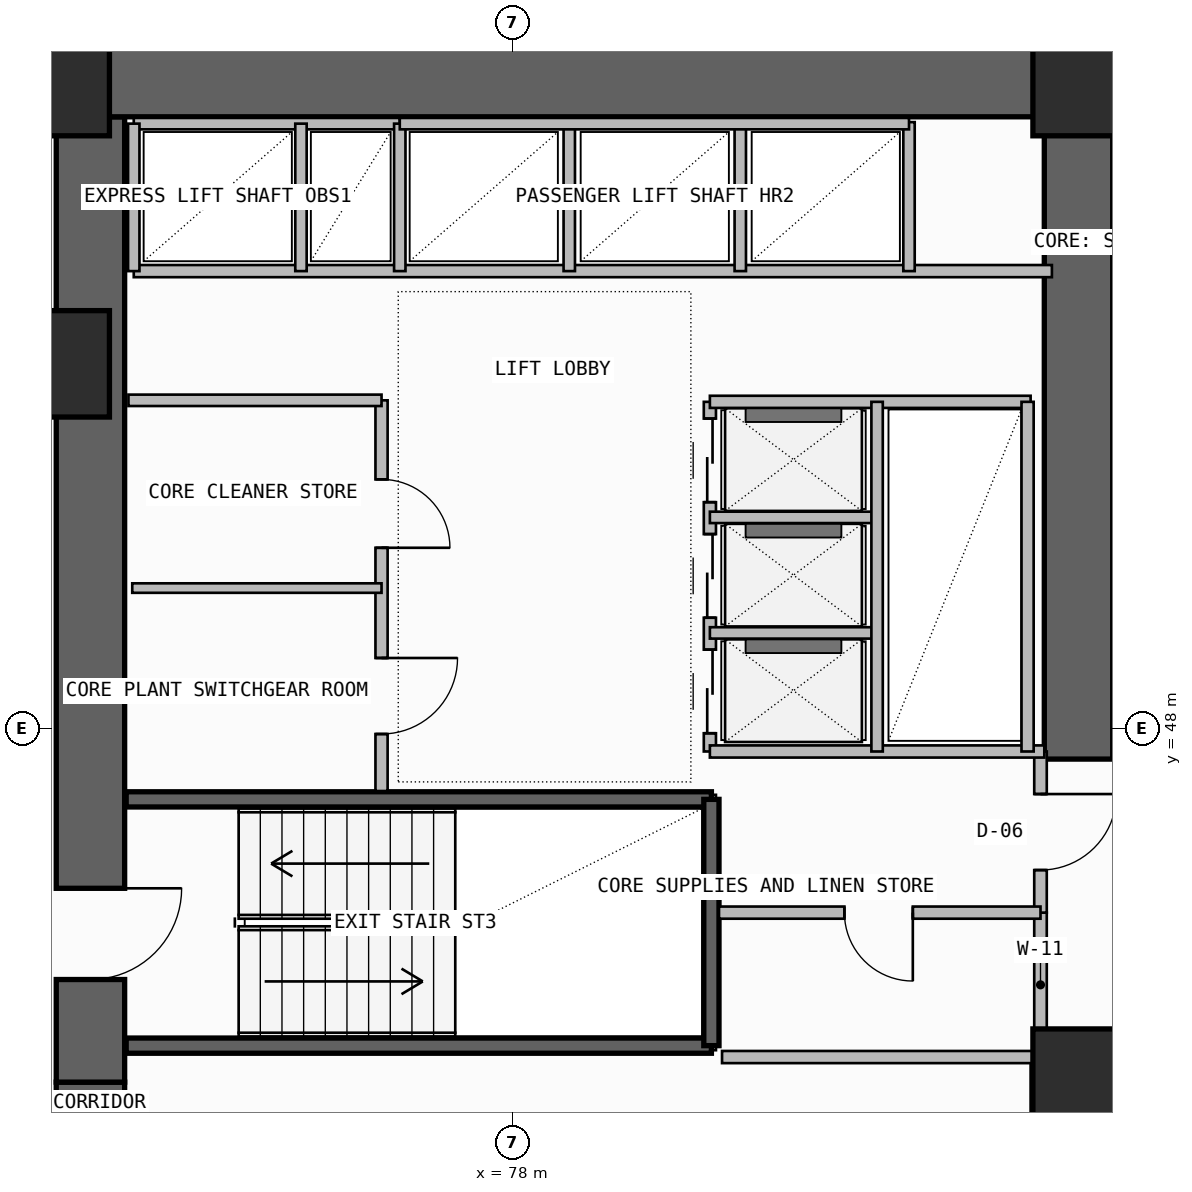
"""IFC4 building model, lengths in metres.
Left out: names, types, materials, properties, quantities, classifications, styles, units other than length and angle.
Written with IfcOpenShell. Run it as: python <this file> out.ifc"""

import sys

from ifc_helpers import new_model, si_unit, direction, frame, frame_2d, origin, origin_2d, place, context, subcontext, project, spatial, rectangle, extrude, element, fill, save


model = new_model("IFC4")
c1 = context("Model", 3, precision=1e-05, world=origin(), true_north=direction((0.0, 1.0)))
c2 = subcontext(c1, "Body", "Model", "MODEL_VIEW")
j1 = project(units=[si_unit("LENGTHUNIT", "METRE"), si_unit("PLANEANGLEUNIT", "RADIAN")], contexts=[c1])
p1 = place(None, origin())
s1 = spatial("IfcSite", under=j1, at=p1, CompositionType="ELEMENT")
p2 = place(p1, origin())
s2 = spatial("IfcBuilding", under=s1, at=p2, CompositionType="ELEMENT")
p3 = place(p2, frame((0.0, 0.0, 113.7)))
s3 = spatial("IfcBuildingStorey", under=s2, at=p3, CompositionType="ELEMENT", Elevation=113.7)
p4 = place(p3, frame((72.45, 35.5, -0.26), z_axis=(0.0, 0.0, 1.0), x_axis=(0.0, 1.0, 0.0)))
e1 = element("IfcWall", 1, at=p4, inside=s3, PredefinedType="SHEAR", context=c2, shape_type="SweptSolid", body=[
    extrude(rectangle(XDim=7.85, YDim=0.9, at=frame_2d((3.925, 0.0))), origin(), (0.0, 0.0, 1.0), 3.6),
])
p5 = place(p4, frame((1.45, 0.0, 0.26)))
e2 = element("IfcOpeningElement", 2, at=p5, cuts=e1, PredefinedType="OPENING", context=c2, shape_type="SweptSolid", body=[
    extrude(rectangle(XDim=1.2, YDim=2.2, at=frame_2d((0.6, 1.1))), frame((0.0, 0.46, 0.0), z_axis=(0.0, -1.0, 0.0), x_axis=(1.0, 0.0, 0.0)), (0.0, 0.0, 1.0), 0.92),
])
p6 = place(p3, frame((72.45, 43.35, -0.26), z_axis=(0.0, 0.0, 1.0), x_axis=(0.0, 1.0, 0.0)))
e3 = element("IfcWall", 3, at=p6, inside=s3, PredefinedType="SHEAR", context=c2, shape_type="SweptSolid", body=[
    extrude(rectangle(XDim=12.7, YDim=0.9, at=frame_2d((6.35, 0.0))), origin(), (0.0, 0.0, 1.0), 3.6),
])
p7 = place(p6, frame((1.35, 0.0, 0.26)))
e4 = element("IfcOpeningElement", 4, at=p7, cuts=e3, PredefinedType="OPENING", context=c2, shape_type="SweptSolid", body=[
    extrude(rectangle(XDim=1.2, YDim=2.2, at=frame_2d((0.6, 1.1))), frame((0.0, 0.46, 0.0), z_axis=(0.0, -1.0, 0.0), x_axis=(1.0, 0.0, 0.0)), (0.0, 0.0, 1.0), 0.92),
])
p8 = place(p3, frame((72.0, 56.5, -0.26), z_axis=(0.0, 0.0, 1.0), x_axis=(1.0, 0.0, 0.0)))
e5 = element("IfcWall", 5, at=p8, inside=s3, PredefinedType="SHEAR", context=c2, shape_type="SweptSolid", body=[
    extrude(rectangle(XDim=13.9, YDim=0.9, at=frame_2d((6.95, 0.0))), origin(), (0.0, 0.0, 1.0), 3.6),
])
p9 = place(p3, frame((85.45, 47.6, -0.26), z_axis=(0.0, 0.0, 1.0), x_axis=(0.0, 1.0, 0.0)))
e6 = element("IfcWall", 6, at=p9, inside=s3, PredefinedType="SHEAR", context=c2, shape_type="SweptSolid", body=[
    extrude(rectangle(XDim=8.45, YDim=0.9, at=frame_2d((4.225, 0.0))), origin(), (0.0, 0.0, 1.0), 3.6),
])
for number, where, z_axis, x_axis in (
    (7, (85.55, 43.35, 0.0), (0.0, 0.0, 1.0), (1.0, 0.0, 0.0)),
    (8, (72.0, 52.8, 0.0), (0.0, 0.0, 1.0), (1.0, 0.0, 0.0)),
    (9, (72.0, 56.5, 0.0), (0.0, 0.0, 1.0), (1.0, 0.0, 0.0)),
    (10, (85.55, 56.5, 0.0), (0.0, 0.0, 1.0), (1.0, 0.0, 0.0)),
):
    element("IfcColumn", number, at=place(p3, frame(where, z_axis=z_axis, x_axis=x_axis)), inside=s3, PredefinedType="COLUMN", context=c2, shape_type="SweptSolid", body=[
        extrude(rectangle(XDim=1.4, YDim=1.4, at=origin_2d()), origin(), (0.0, 0.0, 1.0), 3.6),
    ])
p10 = place(p3, frame((84.92, 38.85, 0.0), z_axis=(0.0, 0.0, 1.0), x_axis=(0.0, 1.0, 0.0)))
e11 = element("IfcWall", 11, at=p10, inside=s3, PredefinedType="SOLIDWALL", context=c2, shape_type="SweptSolid", body=[
    extrude(rectangle(XDim=4.83, YDim=0.2, at=frame_2d((2.415, 0.0))), origin(), (0.0, 0.0, 1.0), 3.34),
])
p11 = place(p10, frame((1.25, 0.0, 0.0)))
e12 = element("IfcOpeningElement", 12, at=p11, cuts=e11, PredefinedType="OPENING", context=c2, shape_type="SweptSolid", body=[
    extrude(rectangle(XDim=1.1, YDim=2.2, at=frame_2d((0.55, 1.1))), frame((0.0, 0.11, 0.0), z_axis=(0.0, -1.0, 0.0), x_axis=(1.0, 0.0, 0.0)), (0.0, 0.0, 1.0), 0.22),
])
for number, where, z_axis, x_axis in (
    (13, (72.92, 43.83, -0.26), (0.0, 0.0, 1.0), (1.0, 0.0, 0.0)),
    (14, (72.92, 47.07, -0.26), (0.0, 0.0, 1.0), (1.0, 0.0, 0.0)),
):
    element("IfcWall", number, at=place(p3, frame(where, z_axis=z_axis, x_axis=x_axis)), inside=s3, PredefinedType="SOLIDWALL", context=c2, shape_type="SweptSolid", body=[
        extrude(rectangle(XDim=7.7, YDim=0.2, at=frame_2d((3.85, 0.0))), origin(), (0.0, 0.0, 1.0), 3.6),
    ])
p12 = place(p3, frame((80.62, 43.83, -0.26), z_axis=(0.0, 0.0, 1.0), x_axis=(0.0, 1.0, 0.0)))
e15 = element("IfcWall", 15, at=p12, inside=s3, PredefinedType="SOLIDWALL", context=c2, shape_type="SweptSolid", body=[
    extrude(rectangle(XDim=3.24, YDim=0.2, at=frame_2d((1.62, 0.0))), origin(), (0.0, 0.0, 1.0), 3.6),
])
p13 = place(p3, frame((84.95, 43.68, 0.0), z_axis=(0.0, 0.0, 1.0), x_axis=(0.0, 1.0, 0.0)))
e16 = element("IfcWall", 16, at=p13, inside=s3, PredefinedType="PLUMBINGWALL", context=c2, shape_type="SweptSolid", body=[
    extrude(rectangle(XDim=1.9, YDim=0.165, at=frame_2d((0.95, 0.0))), origin(), (0.0, 0.0, 1.0), 3.34),
])
p14 = place(p3, frame((84.95, 45.58, 0.0), z_axis=(0.0, 0.0, 1.0), x_axis=(0.0, 1.0, 0.0)))
e17 = element("IfcWall", 17, at=p14, inside=s3, PredefinedType="PARTITIONING", context=c2, shape_type="SweptSolid", body=[
    extrude(rectangle(XDim=2.12, YDim=0.165, at=frame_2d((1.06, 0.0))), origin(), (0.0, 0.0, 1.0), 3.34),
])
p15 = place(p14, frame((0.56, 0.0, 0.0)))
e18 = element("IfcOpeningElement", 18, at=p15, cuts=e17, PredefinedType="OPENING", context=c2, shape_type="SweptSolid", body=[
    extrude(rectangle(XDim=1.0, YDim=2.2, at=frame_2d((0.5, 1.1))), frame((0.0, 0.093, 0.0), z_axis=(0.0, -1.0, 0.0), x_axis=(1.0, 0.0, 0.0)), (0.0, 0.0, 1.0), 0.185),
])
p16 = place(p3, frame((80.72, 45.58, 0.0), z_axis=(0.0, 0.0, 1.0), x_axis=(1.0, 0.0, 0.0)))
e19 = element("IfcWall", 19, at=p16, inside=s3, PredefinedType="PLUMBINGWALL", context=c2, shape_type="SweptSolid", body=[
    extrude(rectangle(XDim=4.23, YDim=0.16, at=frame_2d((2.115, 0.0))), origin(), (0.0, 0.0, 1.0), 3.34),
])
p17 = place(p16, frame((1.65, 0.0, 0.0)))
e20 = element("IfcOpeningElement", 20, at=p17, cuts=e19, PredefinedType="OPENING", context=c2, shape_type="SweptSolid", body=[
    extrude(rectangle(XDim=0.9, YDim=2.1, at=frame_2d((0.45, 1.05))), frame((0.0, 0.09, 0.0), z_axis=(0.0, -1.0, 0.0), x_axis=(1.0, 0.0, 0.0)), (0.0, 0.0, 1.0), 0.18),
])
p18 = place(p3, frame((80.76, 43.68, 0.0), z_axis=(0.0, 0.0, 1.0), x_axis=(1.0, 0.0, 0.0)))
e21 = element("IfcWall", 21, at=p18, inside=s3, PredefinedType="PLUMBINGWALL", context=c2, shape_type="SweptSolid", body=[
    extrude(rectangle(XDim=4.19, YDim=0.16, at=frame_2d((2.095, 0.0))), origin(), (0.0, 0.0, 1.0), 3.34),
])
p19 = place(p3, frame((76.28, 47.18, 0.0), z_axis=(0.0, 0.0, 1.0), x_axis=(0.0, 1.0, 0.0)))
e22 = element("IfcWall", 22, at=p19, inside=s3, PredefinedType="SOLIDWALL", context=c2, shape_type="SweptSolid", body=[
    extrude(rectangle(XDim=5.14, YDim=0.16, at=frame_2d((2.57, 0.0))), origin(), (0.0, 0.0, 1.0), 3.34),
])
p20 = place(p19, frame((0.75, 0.0, 0.0)))
e23 = element("IfcOpeningElement", 23, at=p20, cuts=e22, PredefinedType="OPENING", context=c2, shape_type="SweptSolid", body=[
    extrude(rectangle(XDim=1.0, YDim=2.2, at=frame_2d((0.5, 1.1))), frame((0.0, 0.09, 0.0), z_axis=(0.0, -1.0, 0.0), x_axis=(1.0, 0.0, 0.0)), (0.0, 0.0, 1.0), 0.18),
])
p21 = place(p19, frame((3.2, 0.0, 0.0)))
e24 = element("IfcOpeningElement", 24, at=p21, cuts=e22, PredefinedType="OPENING", context=c2, shape_type="SweptSolid", body=[
    extrude(rectangle(XDim=0.9, YDim=2.1, at=frame_2d((0.45, 1.05))), frame((0.0, 0.09, 0.0), z_axis=(0.0, -1.0, 0.0), x_axis=(1.0, 0.0, 0.0)), (0.0, 0.0, 1.0), 0.18),
])
p22 = place(p3, frame((72.95, 52.32, 0.0), z_axis=(0.0, 0.0, 1.0), x_axis=(1.0, 0.0, 0.0)))
e25 = element("IfcWall", 25, at=p22, inside=s3, PredefinedType="SOLIDWALL", context=c2, shape_type="SweptSolid", body=[
    extrude(rectangle(XDim=3.33, YDim=0.15, at=frame_2d((1.665, 0.0))), origin(), (0.0, 0.0, 1.0), 3.34),
])
p23 = place(p3, frame((73.0, 49.85, 0.0), z_axis=(0.0, 0.0, 1.0), x_axis=(1.0, 0.0, 0.0)))
e26 = element("IfcWall", 26, at=p23, inside=s3, PredefinedType="PARTITIONING", context=c2, shape_type="SweptSolid", body=[
    extrude(rectangle(XDim=3.28, YDim=0.125, at=frame_2d((1.64, 0.0))), origin(), (0.0, 0.0, 1.0), 3.34),
])
p24 = place(p3, frame((80.6, 47.7, 0.0), z_axis=(0.0, 0.0, 1.0), x_axis=(0.0, 1.0, 0.0)))
e27 = element("IfcWall", 27, at=p24, inside=s3, PredefinedType="SOLIDWALL", context=c2, shape_type="SweptSolid", body=[
    extrude(rectangle(XDim=4.6, YDim=0.16, at=frame_2d((2.3, 0.0))), origin(), (0.0, 0.0, 1.0), 3.34),
])
p25 = place(p24, frame((0.24, 0.0, 0.0)))
e28 = element("IfcOpeningElement", 28, at=p25, cuts=e27, PredefinedType="OPENING", context=c2, shape_type="SweptSolid", body=[
    extrude(rectangle(XDim=1.1, YDim=2.25, at=frame_2d((0.55, 1.125))), frame((0.0, 0.09, 0.0), z_axis=(0.0, -1.0, 0.0), x_axis=(1.0, 0.0, 0.0)), (0.0, 0.0, 1.0), 0.18),
])
p26 = place(p24, frame((1.76, 0.0, 0.0)))
e29 = element("IfcOpeningElement", 29, at=p26, cuts=e27, PredefinedType="OPENING", context=c2, shape_type="SweptSolid", body=[
    extrude(rectangle(XDim=1.1, YDim=2.25, at=frame_2d((0.55, 1.125))), frame((0.0, 0.09, 0.0), z_axis=(0.0, -1.0, 0.0), x_axis=(1.0, 0.0, 0.0)), (0.0, 0.0, 1.0), 0.18),
])
p27 = place(p24, frame((3.28, 0.0, 0.0)))
e30 = element("IfcOpeningElement", 30, at=p27, cuts=e27, PredefinedType="OPENING", context=c2, shape_type="SweptSolid", body=[
    extrude(rectangle(XDim=1.1, YDim=2.25, at=frame_2d((0.55, 1.125))), frame((0.0, 0.09, 0.0), z_axis=(0.0, -1.0, 0.0), x_axis=(1.0, 0.0, 0.0)), (0.0, 0.0, 1.0), 0.18),
])
p28 = place(p3, frame((80.6, 47.7, 0.0), z_axis=(0.0, 0.0, 1.0), x_axis=(1.0, 0.0, 0.0)))
e31 = element("IfcWall", 31, at=p28, inside=s3, PredefinedType="SOLIDWALL", context=c2, shape_type="SweptSolid", body=[
    extrude(rectangle(XDim=4.4, YDim=0.16, at=frame_2d((2.2, 0.0))), origin(), (0.0, 0.0, 1.0), 3.34),
])
p29 = place(p3, frame((80.6, 52.3, 0.0), z_axis=(0.0, 0.0, 1.0), x_axis=(1.0, 0.0, 0.0)))
e32 = element("IfcWall", 32, at=p29, inside=s3, PredefinedType="SOLIDWALL", context=c2, shape_type="SweptSolid", body=[
    extrude(rectangle(XDim=4.22, YDim=0.16, at=frame_2d((2.11, 0.0))), origin(), (0.0, 0.0, 1.0), 3.34),
])
for number, where, z_axis, x_axis in (
    (33, (80.6, 49.26, 0.0), (0.0, 0.0, 1.0), (1.0, 0.0, 0.0)),
    (34, (80.6, 50.78, 0.0), (0.0, 0.0, 1.0), (1.0, 0.0, 0.0)),
):
    element("IfcWall", number, at=place(p3, frame(where, z_axis=z_axis, x_axis=x_axis)), inside=s3, PredefinedType="PLUMBINGWALL", context=c2, shape_type="SweptSolid", body=[
        extrude(rectangle(XDim=2.2, YDim=0.15, at=frame_2d((1.1, 0.0))), origin(), (0.0, 0.0, 1.0), 3.34),
    ])
p30 = place(p3, frame((82.8, 47.7, 0.0), z_axis=(0.0, 0.0, 1.0), x_axis=(0.0, 1.0, 0.0)))
e35 = element("IfcWall", 35, at=p30, inside=s3, PredefinedType="PLUMBINGWALL", context=c2, shape_type="SweptSolid", body=[
    extrude(rectangle(XDim=4.6, YDim=0.15, at=frame_2d((2.3, 0.0))), origin(), (0.0, 0.0, 1.0), 3.34),
])
p31 = place(p3, frame((84.78, 47.7, 0.0), z_axis=(0.0, 0.0, 1.0), x_axis=(0.0, 1.0, 0.0)))
e36 = element("IfcWall", 36, at=p31, inside=s3, PredefinedType="SOLIDWALL", context=c2, shape_type="SweptSolid", body=[
    extrude(rectangle(XDim=4.6, YDim=0.16, at=frame_2d((2.3, 0.0))), origin(), (0.0, 0.0, 1.0), 3.34),
])
p32 = place(p3, frame((73.02, 54.02, 0.0), z_axis=(0.0, 0.0, 1.0), x_axis=(1.0, 0.0, 0.0)))
e37 = element("IfcWall", 37, at=p32, inside=s3, PredefinedType="SOLIDWALL", context=c2, shape_type="SweptSolid", body=[
    extrude(rectangle(XDim=12.08, YDim=0.16, at=frame_2d((6.04, 0.0))), origin(), (0.0, 0.0, 1.0), 3.34),
])
p33 = place(p3, frame((73.02, 55.96, 0.0), z_axis=(0.0, 0.0, 1.0), x_axis=(1.0, 0.0, 0.0)))
e38 = element("IfcWall", 38, at=p33, inside=s3, PredefinedType="SOLIDWALL", context=c2, shape_type="SweptSolid", body=[
    extrude(rectangle(XDim=3.5, YDim=0.15, at=frame_2d((1.75, 0.0))), origin(), (0.0, 0.0, 1.0), 3.34),
])
p34 = place(p3, frame((73.02, 54.02, 0.0), z_axis=(0.0, 0.0, 1.0), x_axis=(0.0, 1.0, 0.0)))
e39 = element("IfcWall", 39, at=p34, inside=s3, PredefinedType="PLUMBINGWALL", context=c2, shape_type="SweptSolid", body=[
    extrude(rectangle(XDim=1.94, YDim=0.15, at=frame_2d((0.97, 0.0))), origin(), (0.0, 0.0, 1.0), 3.34),
])
p35 = place(p3, frame((76.52, 54.02, 0.0), z_axis=(0.0, 0.0, 1.0), x_axis=(0.0, 1.0, 0.0)))
e40 = element("IfcWall", 40, at=p35, inside=s3, PredefinedType="SOLIDWALL", context=c2, shape_type="SweptSolid", body=[
    extrude(rectangle(XDim=1.94, YDim=0.15, at=frame_2d((0.97, 0.0))), origin(), (0.0, 0.0, 1.0), 3.34),
])
p36 = place(p3, frame((75.22, 54.02, 0.0), z_axis=(0.0, 0.0, 1.0), x_axis=(0.0, 1.0, 0.0)))
e41 = element("IfcWall", 41, at=p36, inside=s3, PredefinedType="PLUMBINGWALL", context=c2, shape_type="SweptSolid", body=[
    extrude(rectangle(XDim=1.94, YDim=0.15, at=frame_2d((0.97, 0.0))), origin(), (0.0, 0.0, 1.0), 3.34),
])
for number, where, z_axis, x_axis in (
    (42, (78.75, 54.02, 0.0), (0.0, 0.0, 1.0), (0.0, 1.0, 0.0)),
    (43, (81.0, 54.02, 0.0), (0.0, 0.0, 1.0), (0.0, 1.0, 0.0)),
):
    element("IfcWall", number, at=place(p3, frame(where, z_axis=z_axis, x_axis=x_axis)), inside=s3, PredefinedType="PLUMBINGWALL", context=c2, shape_type="SweptSolid", body=[
        extrude(rectangle(XDim=1.96, YDim=0.15, at=frame_2d((0.98, 0.0))), origin(), (0.0, 0.0, 1.0), 3.34),
    ])
p37 = place(p3, frame((83.22, 54.02, 0.0), z_axis=(0.0, 0.0, 1.0), x_axis=(0.0, 1.0, 0.0)))
e44 = element("IfcWall", 44, at=p37, inside=s3, PredefinedType="SOLIDWALL", context=c2, shape_type="SweptSolid", body=[
    extrude(rectangle(XDim=1.96, YDim=0.15, at=frame_2d((0.98, 0.0))), origin(), (0.0, 0.0, 1.0), 3.34),
])
p38 = place(p3, frame((76.52, 55.96, 0.0), z_axis=(0.0, 0.0, 1.0), x_axis=(1.0, 0.0, 0.0)))
e45 = element("IfcWall", 45, at=p38, inside=s3, PredefinedType="SOLIDWALL", context=c2, shape_type="SweptSolid", body=[
    extrude(rectangle(XDim=6.7, YDim=0.15, at=frame_2d((3.35, 0.0))), origin(), (0.0, 0.0, 1.0), 3.34),
])
p39 = place(p7, frame((1.2, 0.0, 0.0), z_axis=(0.0, 0.0, 1.0), x_axis=(-1.0, 0.0, 0.0)))
e46 = element("IfcDoor", 46, at=p39, inside=s3, OperationType="SINGLE_SWING_LEFT", PredefinedType="USERDEFINED", context=c2, shape_type="SweptSolid", body=[
    extrude(rectangle(XDim=1.2, YDim=2.2, at=frame_2d((0.6, 1.1))), frame((0.0, 0.025, 0.0), z_axis=(0.0, -1.0, 0.0), x_axis=(1.0, 0.0, 0.0)), (0.0, 0.0, 1.0), 0.05),
])
fill(e4, e46)
p40 = place(p15, frame((1.0, 0.0, 0.0), z_axis=(0.0, 0.0, 1.0), x_axis=(-1.0, 0.0, 0.0)))
e47 = element("IfcDoor", 47, at=p40, inside=s3, OperationType="SINGLE_SWING_LEFT", PredefinedType="DOOR", context=c2, shape_type="SweptSolid", body=[
    extrude(rectangle(XDim=1.0, YDim=2.2, at=frame_2d((0.5, 1.1))), frame((0.0, 0.025, 0.0), z_axis=(0.0, -1.0, 0.0), x_axis=(1.0, 0.0, 0.0)), (0.0, 0.0, 1.0), 0.05),
])
fill(e18, e47)
p41 = place(p17, frame((0.9, 0.0, 0.0), z_axis=(0.0, 0.0, 1.0), x_axis=(-1.0, 0.0, 0.0)))
e48 = element("IfcDoor", 48, at=p41, inside=s3, OperationType="SINGLE_SWING_LEFT", PredefinedType="DOOR", context=c2, shape_type="SweptSolid", body=[
    extrude(rectangle(XDim=0.9, YDim=2.1, at=frame_2d((0.45, 1.05))), frame((0.0, 0.025, 0.0), z_axis=(0.0, -1.0, 0.0), x_axis=(1.0, 0.0, 0.0)), (0.0, 0.0, 1.0), 0.05),
])
fill(e20, e48)
p42 = place(p20, frame((1.0, 0.0, 0.0), z_axis=(0.0, 0.0, 1.0), x_axis=(-1.0, 0.0, 0.0)))
e49 = element("IfcDoor", 49, at=p42, inside=s3, OperationType="SINGLE_SWING_LEFT", PredefinedType="DOOR", context=c2, shape_type="SweptSolid", body=[
    extrude(rectangle(XDim=1.0, YDim=2.2, at=frame_2d((0.5, 1.1))), frame((0.0, 0.025, 0.0), z_axis=(0.0, -1.0, 0.0), x_axis=(1.0, 0.0, 0.0)), (0.0, 0.0, 1.0), 0.05),
])
fill(e23, e49)
p43 = place(p21, frame((0.9, 0.0, 0.0), z_axis=(0.0, 0.0, 1.0), x_axis=(-1.0, 0.0, 0.0)))
e50 = element("IfcDoor", 50, at=p43, inside=s3, OperationType="SINGLE_SWING_RIGHT", PredefinedType="DOOR", context=c2, shape_type="SweptSolid", body=[
    extrude(rectangle(XDim=0.9, YDim=2.1, at=frame_2d((0.45, 1.05))), frame((0.0, 0.025, 0.0), z_axis=(0.0, -1.0, 0.0), x_axis=(1.0, 0.0, 0.0)), (0.0, 0.0, 1.0), 0.05),
])
fill(e24, e50)
p44 = place(p25, frame((1.1, 0.0, 0.0), z_axis=(0.0, 0.0, 1.0), x_axis=(-1.0, 0.0, 0.0)))
e51 = element("IfcDoor", 51, at=p44, inside=s3, OperationType="DOUBLE_DOOR_SLIDING", PredefinedType="DOOR", context=c2, shape_type="SweptSolid", body=[
    extrude(rectangle(XDim=1.1, YDim=2.25, at=frame_2d((0.55, 1.125))), frame((0.0, 0.025, 0.0), z_axis=(0.0, -1.0, 0.0), x_axis=(1.0, 0.0, 0.0)), (0.0, 0.0, 1.0), 0.05),
])
fill(e28, e51)
p45 = place(p26, frame((1.1, 0.0, 0.0), z_axis=(0.0, 0.0, 1.0), x_axis=(-1.0, 0.0, 0.0)))
e52 = element("IfcDoor", 52, at=p45, inside=s3, OperationType="DOUBLE_DOOR_SLIDING", PredefinedType="DOOR", context=c2, shape_type="SweptSolid", body=[
    extrude(rectangle(XDim=1.1, YDim=2.25, at=frame_2d((0.55, 1.125))), frame((0.0, 0.025, 0.0), z_axis=(0.0, -1.0, 0.0), x_axis=(1.0, 0.0, 0.0)), (0.0, 0.0, 1.0), 0.05),
])
fill(e29, e52)
p46 = place(p27, frame((1.1, 0.0, 0.0), z_axis=(0.0, 0.0, 1.0), x_axis=(-1.0, 0.0, 0.0)))
e53 = element("IfcDoor", 53, at=p46, inside=s3, OperationType="DOUBLE_DOOR_SLIDING", PredefinedType="DOOR", context=c2, shape_type="SweptSolid", body=[
    extrude(rectangle(XDim=1.1, YDim=2.25, at=frame_2d((0.55, 1.125))), frame((0.0, 0.025, 0.0), z_axis=(0.0, -1.0, 0.0), x_axis=(1.0, 0.0, 0.0)), (0.0, 0.0, 1.0), 0.05),
])
fill(e30, e53)
save(model, sys.argv[1])
